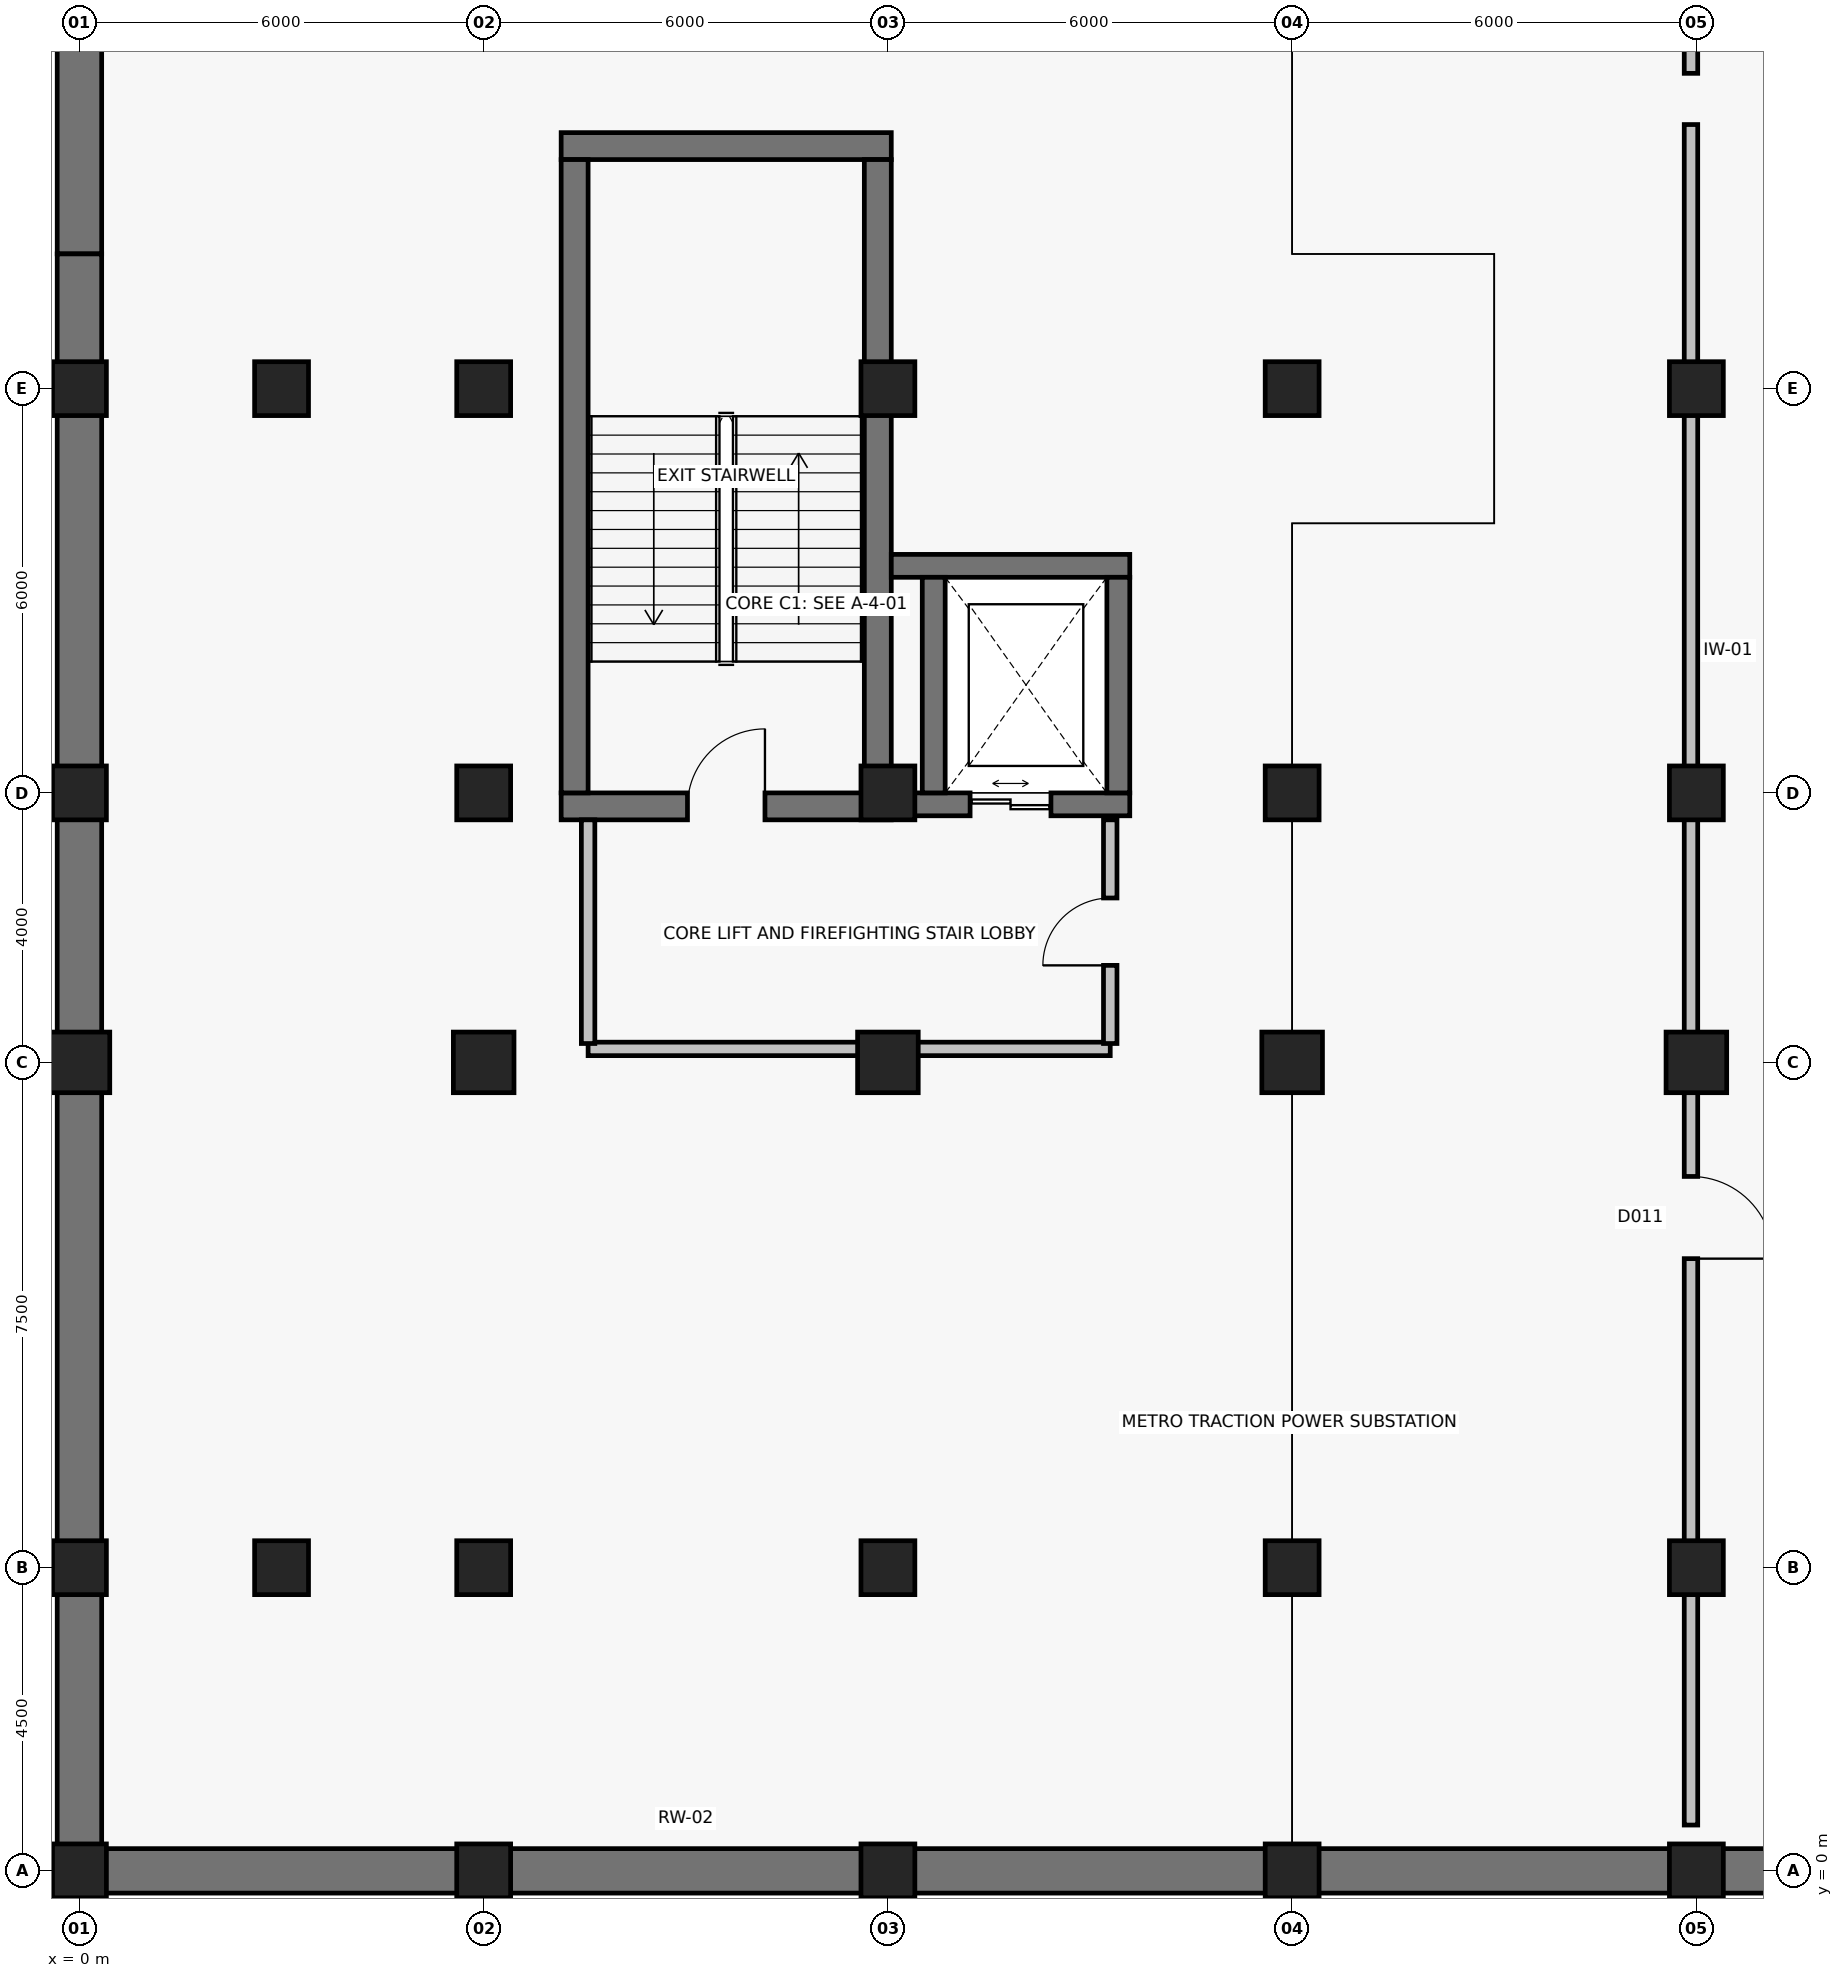
"""IFC4 building model, lengths in metres.
Left out: names, types, materials, properties, quantities, classifications, styles, units other than length and angle.
Written with IfcOpenShell. Run it as: python <this file> out.ifc"""

import sys

from ifc_helpers import new_model, si_unit, direction, frame, frame_2d, origin, origin_2d, place, context, subcontext, project, spatial, rectangle, extrude, element, fill, save


model = new_model("IFC4")
c1 = context("Model", 3, precision=1e-05, world=origin(), true_north=direction((0.0, 1.0)))
c2 = subcontext(c1, "Body", "Model", "MODEL_VIEW")
j1 = project(units=[si_unit("LENGTHUNIT", "METRE"), si_unit("PLANEANGLEUNIT", "RADIAN")], contexts=[c1])
p1 = place(None, origin())
s1 = spatial("IfcSite", under=j1, at=p1, CompositionType="ELEMENT")
p2 = place(p1, origin())
s2 = spatial("IfcBuilding", under=s1, at=p2, CompositionType="ELEMENT")
p3 = place(p2, frame((0.0, 0.0, -4.8)))
s3 = spatial("IfcBuildingStorey", under=s2, at=p3, CompositionType="ELEMENT", Elevation=-4.8)
for number, where, z_axis, x_axis in (
    (1, (0.0, 0.0, 0.0), (0.0, 0.0, 1.0), (1.0, 0.0, 0.0)),
    (2, (0.0, 4.5, 0.0), (0.0, 0.0, 1.0), (1.0, 0.0, 0.0)),
):
    element("IfcColumn", number, at=place(p3, frame(where, z_axis=z_axis, x_axis=x_axis)), inside=s3, PredefinedType="COLUMN", context=c2, shape_type="SweptSolid", body=[
        extrude(rectangle(XDim=0.8, YDim=0.8, at=origin_2d()), origin(), (0.0, 0.0, 1.0), 4.8),
    ])
p4 = place(p3, frame((0.0, 12.0, 0.0), z_axis=(0.0, 0.0, 1.0), x_axis=(1.0, 0.0, 0.0)))
e3 = element("IfcColumn", 3, at=p4, inside=s3, PredefinedType="COLUMN", context=c2, shape_type="SweptSolid", body=[
    extrude(rectangle(XDim=0.9, YDim=0.9, at=origin_2d()), origin(), (0.0, 0.0, 1.0), 4.8),
])
for number, where, z_axis, x_axis in (
    (4, (0.0, 16.0, 0.0), (0.0, 0.0, 1.0), (1.0, 0.0, 0.0)),
    (5, (0.0, 22.0, 0.0), (0.0, 0.0, 1.0), (1.0, 0.0, 0.0)),
    (6, (3.0, 4.5, 0.0), (0.0, 0.0, 1.0), (1.0, 0.0, 0.0)),
    (7, (3.0, 22.0, 0.0), (0.0, 0.0, 1.0), (1.0, 0.0, 0.0)),
    (8, (6.0, 0.0, 0.0), (0.0, 0.0, 1.0), (1.0, 0.0, 0.0)),
    (9, (6.0, 4.5, 0.0), (0.0, 0.0, 1.0), (1.0, 0.0, 0.0)),
):
    element("IfcColumn", number, at=place(p3, frame(where, z_axis=z_axis, x_axis=x_axis)), inside=s3, PredefinedType="COLUMN", context=c2, shape_type="SweptSolid", body=[
        extrude(rectangle(XDim=0.8, YDim=0.8, at=origin_2d()), origin(), (0.0, 0.0, 1.0), 4.8),
    ])
p5 = place(p3, frame((6.0, 12.0, 0.0), z_axis=(0.0, 0.0, 1.0), x_axis=(1.0, 0.0, 0.0)))
e10 = element("IfcColumn", 10, at=p5, inside=s3, PredefinedType="COLUMN", context=c2, shape_type="SweptSolid", body=[
    extrude(rectangle(XDim=0.9, YDim=0.9, at=origin_2d()), origin(), (0.0, 0.0, 1.0), 4.8),
])
for number, where, z_axis, x_axis in (
    (11, (6.0, 16.0, 0.0), (0.0, 0.0, 1.0), (1.0, 0.0, 0.0)),
    (12, (6.0, 22.0, 0.0), (0.0, 0.0, 1.0), (1.0, 0.0, 0.0)),
    (13, (12.0, 0.0, 0.0), (0.0, 0.0, 1.0), (1.0, 0.0, 0.0)),
    (14, (12.0, 4.5, 0.0), (0.0, 0.0, 1.0), (1.0, 0.0, 0.0)),
):
    element("IfcColumn", number, at=place(p3, frame(where, z_axis=z_axis, x_axis=x_axis)), inside=s3, PredefinedType="COLUMN", context=c2, shape_type="SweptSolid", body=[
        extrude(rectangle(XDim=0.8, YDim=0.8, at=origin_2d()), origin(), (0.0, 0.0, 1.0), 4.8),
    ])
p6 = place(p3, frame((12.0, 12.0, 0.0), z_axis=(0.0, 0.0, 1.0), x_axis=(1.0, 0.0, 0.0)))
e15 = element("IfcColumn", 15, at=p6, inside=s3, PredefinedType="COLUMN", context=c2, shape_type="SweptSolid", body=[
    extrude(rectangle(XDim=0.9, YDim=0.9, at=origin_2d()), origin(), (0.0, 0.0, 1.0), 4.8),
])
for number, where, z_axis, x_axis in (
    (16, (12.0, 16.0, 0.0), (0.0, 0.0, 1.0), (1.0, 0.0, 0.0)),
    (17, (12.0, 22.0, 0.0), (0.0, 0.0, 1.0), (1.0, 0.0, 0.0)),
    (18, (18.0, 0.0, 0.0), (0.0, 0.0, 1.0), (1.0, 0.0, 0.0)),
    (19, (18.0, 4.5, 0.0), (0.0, 0.0, 1.0), (1.0, 0.0, 0.0)),
):
    element("IfcColumn", number, at=place(p3, frame(where, z_axis=z_axis, x_axis=x_axis)), inside=s3, PredefinedType="COLUMN", context=c2, shape_type="SweptSolid", body=[
        extrude(rectangle(XDim=0.8, YDim=0.8, at=origin_2d()), origin(), (0.0, 0.0, 1.0), 4.8),
    ])
p7 = place(p3, frame((18.0, 12.0, 0.0), z_axis=(0.0, 0.0, 1.0), x_axis=(1.0, 0.0, 0.0)))
e20 = element("IfcColumn", 20, at=p7, inside=s3, PredefinedType="COLUMN", context=c2, shape_type="SweptSolid", body=[
    extrude(rectangle(XDim=0.9, YDim=0.9, at=origin_2d()), origin(), (0.0, 0.0, 1.0), 4.8),
])
for number, where, z_axis, x_axis in (
    (21, (18.0, 16.0, 0.0), (0.0, 0.0, 1.0), (1.0, 0.0, 0.0)),
    (22, (18.0, 22.0, 0.0), (0.0, 0.0, 1.0), (1.0, 0.0, 0.0)),
    (23, (24.0, 0.0, 0.0), (0.0, 0.0, 1.0), (1.0, 0.0, 0.0)),
    (24, (24.0, 4.5, 0.0), (0.0, 0.0, 1.0), (1.0, 0.0, 0.0)),
):
    element("IfcColumn", number, at=place(p3, frame(where, z_axis=z_axis, x_axis=x_axis)), inside=s3, PredefinedType="COLUMN", context=c2, shape_type="SweptSolid", body=[
        extrude(rectangle(XDim=0.8, YDim=0.8, at=origin_2d()), origin(), (0.0, 0.0, 1.0), 4.8),
    ])
p8 = place(p3, frame((24.0, 12.0, 0.0), z_axis=(0.0, 0.0, 1.0), x_axis=(1.0, 0.0, 0.0)))
e25 = element("IfcColumn", 25, at=p8, inside=s3, PredefinedType="COLUMN", context=c2, shape_type="SweptSolid", body=[
    extrude(rectangle(XDim=0.9, YDim=0.9, at=origin_2d()), origin(), (0.0, 0.0, 1.0), 4.8),
])
for number, where, z_axis, x_axis in (
    (26, (24.0, 16.0, 0.0), (0.0, 0.0, 1.0), (1.0, 0.0, 0.0)),
    (27, (24.0, 22.0, 0.0), (0.0, 0.0, 1.0), (1.0, 0.0, 0.0)),
):
    element("IfcColumn", number, at=place(p3, frame(where, z_axis=z_axis, x_axis=x_axis)), inside=s3, PredefinedType="COLUMN", context=c2, shape_type="SweptSolid", body=[
        extrude(rectangle(XDim=0.8, YDim=0.8, at=origin_2d()), origin(), (0.0, 0.0, 1.0), 4.8),
    ])
for number, where, z_axis, x_axis in (
    (28, (0.0, 0.0, 0.0), (0.0, 0.0, 1.0), (1.0, 0.0, 0.0)),
    (29, (18.0, 0.0, 0.0), (0.0, 0.0, 1.0), (1.0, 0.0, 0.0)),
):
    element("IfcWall", number, at=place(p3, frame(where, z_axis=z_axis, x_axis=x_axis)), inside=s3, PredefinedType="USERDEFINED", context=c2, shape_type="SweptSolid", body=[
        extrude(rectangle(XDim=18.0, YDim=0.66, at=frame_2d((9.0, 0.0))), origin(), (0.0, 0.0, 1.0), 4.4),
    ])
for number, where, z_axis, x_axis in (
    (30, (0.0, 48.0, 0.0), (0.0, 0.0, 1.0), (0.0, -1.0, 0.0)),
    (31, (0.0, 24.0, 0.0), (0.0, 0.0, 1.0), (0.0, -1.0, 0.0)),
):
    element("IfcWall", number, at=place(p3, frame(where, z_axis=z_axis, x_axis=x_axis)), inside=s3, PredefinedType="USERDEFINED", context=c2, shape_type="SweptSolid", body=[
        extrude(rectangle(XDim=24.0, YDim=0.66, at=frame_2d((12.0, 0.0))), origin(), (0.0, 0.0, 1.0), 4.4),
    ])
p9 = place(p3, frame((7.15, 15.8, 0.0), z_axis=(0.0, 0.0, 1.0), x_axis=(1.0, 0.0, 0.0)))
e32 = element("IfcWall", 32, at=p9, inside=s3, PredefinedType="SHEAR", context=c2, shape_type="SweptSolid", body=[
    extrude(rectangle(XDim=4.9, YDim=0.4, at=frame_2d((2.45, 0.0))), origin(), (0.0, 0.0, 1.0), 4.4),
])
p10 = place(p9, frame((1.875, 0.0, 0.0)))
e33 = element("IfcOpeningElement", 33, at=p10, cuts=e32, PredefinedType="OPENING", context=c2, shape_type="SweptSolid", body=[
    extrude(rectangle(XDim=1.15, YDim=2.15, at=frame_2d((0.575, 1.075))), frame((0.0, 0.215, 0.0), z_axis=(0.0, -1.0, 0.0), x_axis=(1.0, 0.0, 0.0)), (0.0, 0.0, 1.0), 0.43),
])
p11 = place(p3, frame((12.05, 25.6, 0.0), z_axis=(0.0, 0.0, 1.0), x_axis=(-1.0, 0.0, 0.0)))
e34 = element("IfcWall", 34, at=p11, inside=s3, PredefinedType="SHEAR", context=c2, shape_type="SweptSolid", body=[
    extrude(rectangle(XDim=4.9, YDim=0.4, at=frame_2d((2.45, 0.0))), origin(), (0.0, 0.0, 1.0), 4.4),
])
for number, where, z_axis, x_axis in (
    (35, (7.35, 25.4, 0.0), (0.0, 0.0, 1.0), (0.0, -1.0, 0.0)),
    (36, (11.85, 16.0, 0.0), (0.0, 0.0, 1.0), (0.0, 1.0, 0.0)),
):
    element("IfcWall", number, at=place(p3, frame(where, z_axis=z_axis, x_axis=x_axis)), inside=s3, PredefinedType="SHEAR", context=c2, shape_type="SweptSolid", body=[
        extrude(rectangle(XDim=9.4, YDim=0.4, at=frame_2d((4.7, 0.0))), origin(), (0.0, 0.0, 1.0), 4.4),
    ])
p12 = place(p3, frame((12.05, 15.83, 0.0), z_axis=(0.0, 0.0, 1.0), x_axis=(1.0, 0.0, 0.0)))
e37 = element("IfcWall", 37, at=p12, inside=s3, PredefinedType="SHEAR", context=c2, shape_type="SweptSolid", body=[
    extrude(rectangle(XDim=3.54, YDim=0.34, at=frame_2d((1.77, 0.0))), origin(), (0.0, 0.0, 1.0), 4.4),
])
p13 = place(p12, frame((1.17, 0.0, 0.0)))
e38 = element("IfcOpeningElement", 38, at=p13, cuts=e37, PredefinedType="OPENING", context=c2, shape_type="SweptSolid", body=[
    extrude(rectangle(XDim=1.2, YDim=2.2, at=frame_2d((0.6, 1.1))), frame((0.0, 0.185, 0.0), z_axis=(0.0, -1.0, 0.0), x_axis=(1.0, 0.0, 0.0)), (0.0, 0.0, 1.0), 0.37),
])
p14 = place(p3, frame((15.59, 19.37, 0.0), z_axis=(0.0, 0.0, 1.0), x_axis=(-1.0, 0.0, 0.0)))
e39 = element("IfcWall", 39, at=p14, inside=s3, PredefinedType="SHEAR", context=c2, shape_type="SweptSolid", body=[
    extrude(rectangle(XDim=3.54, YDim=0.34, at=frame_2d((1.77, 0.0))), origin(), (0.0, 0.0, 1.0), 4.4),
])
for number, where, z_axis, x_axis in (
    (40, (12.68, 19.2, 0.0), (0.0, 0.0, 1.0), (0.0, -1.0, 0.0)),
    (41, (15.42, 16.0, 0.0), (0.0, 0.0, 1.0), (0.0, 1.0, 0.0)),
):
    element("IfcWall", number, at=place(p3, frame(where, z_axis=z_axis, x_axis=x_axis)), inside=s3, PredefinedType="SHEAR", context=c2, shape_type="SweptSolid", body=[
        extrude(rectangle(XDim=3.2, YDim=0.34, at=frame_2d((1.6, 0.0))), origin(), (0.0, 0.0, 1.0), 4.4),
    ])
p15 = place(p3, frame((7.55, 12.2, 0.0), z_axis=(0.0, 0.0, 1.0), x_axis=(1.0, 0.0, 0.0)))
e42 = element("IfcWall", 42, at=p15, inside=s3, PredefinedType="PARTITIONING", context=c2, shape_type="SweptSolid", body=[
    extrude(rectangle(XDim=7.75, YDim=0.2, at=frame_2d((3.875, 0.0))), origin(), (0.0, 0.0, 1.0), 3.741),
])
p16 = place(p3, frame((7.55, 15.6, 0.0), z_axis=(0.0, 0.0, 1.0), x_axis=(0.0, -1.0, 0.0)))
e43 = element("IfcWall", 43, at=p16, inside=s3, PredefinedType="PARTITIONING", context=c2, shape_type="SweptSolid", body=[
    extrude(rectangle(XDim=3.32, YDim=0.2, at=frame_2d((1.66, 0.0))), origin(), (0.0, 0.0, 1.0), 3.741),
])
p17 = place(p3, frame((15.3, 12.28, 0.0), z_axis=(0.0, 0.0, 1.0), x_axis=(0.0, 1.0, 0.0)))
e44 = element("IfcWall", 44, at=p17, inside=s3, PredefinedType="PARTITIONING", context=c2, shape_type="SweptSolid", body=[
    extrude(rectangle(XDim=3.32, YDim=0.2, at=frame_2d((1.66, 0.0))), origin(), (0.0, 0.0, 1.0), 3.817),
])
p18 = place(p17, frame((1.16, 0.0, 0.0)))
e45 = element("IfcOpeningElement", 45, at=p18, cuts=e44, PredefinedType="OPENING", context=c2, shape_type="SweptSolid", body=[
    extrude(rectangle(XDim=1.0, YDim=2.15, at=frame_2d((0.5, 1.075))), frame((0.0, 0.115, 0.0), z_axis=(0.0, -1.0, 0.0), x_axis=(1.0, 0.0, 0.0)), (0.0, 0.0, 1.0), 0.23),
])
p19 = place(p3, frame((23.92, 25.92, 0.0), z_axis=(0.0, 0.0, 1.0), x_axis=(0.0, -1.0, 0.0)))
e46 = element("IfcWall", 46, at=p19, inside=s3, PredefinedType="PARTITIONING", context=c2, shape_type="SweptSolid", body=[
    extrude(rectangle(XDim=25.24, YDim=0.2, at=frame_2d((12.62, 0.0))), origin(), (0.0, 0.0, 1.0), 3.741),
])
p20 = place(p19, frame((15.613, 0.0, 0.0)))
e47 = element("IfcOpeningElement", 47, at=p20, cuts=e46, PredefinedType="OPENING", context=c2, shape_type="SweptSolid", body=[
    extrude(rectangle(XDim=1.22, YDim=2.2, at=frame_2d((0.61, 1.1))), frame((0.0, 0.115, 0.0), z_axis=(0.0, -1.0, 0.0), x_axis=(1.0, 0.0, 0.0)), (0.0, 0.0, 1.0), 0.23),
])
p21 = place(p3, frame((23.92, 51.92, 0.0), z_axis=(0.0, 0.0, 1.0), x_axis=(0.0, -1.0, 0.0)))
e48 = element("IfcWall", 48, at=p21, inside=s3, PredefinedType="PARTITIONING", context=c2, shape_type="SweptSolid", body=[
    extrude(rectangle(XDim=25.24, YDim=0.2, at=frame_2d((12.62, 0.0))), origin(), (0.0, 0.0, 1.0), 3.587),
])
p22 = place(p21, frame((5.262, 0.0, 0.0)))
e49 = element("IfcOpeningElement", 49, at=p22, cuts=e48, PredefinedType="OPENING", context=c2, shape_type="SweptSolid", body=[
    extrude(rectangle(XDim=1.32, YDim=2.2, at=frame_2d((0.66, 1.1))), frame((0.0, 0.115, 0.0), z_axis=(0.0, -1.0, 0.0), x_axis=(1.0, 0.0, 0.0)), (0.0, 0.0, 1.0), 0.23),
])
p23 = place(p10, origin())
e50 = element("IfcDoor", 50, at=p23, inside=s3, OperationType="SINGLE_SWING_RIGHT", PredefinedType="DOOR", context=c2, shape_type="SweptSolid", body=[
    extrude(rectangle(XDim=1.15, YDim=2.15, at=frame_2d((0.575, 1.075))), frame((0.0, 0.025, 0.0), z_axis=(0.0, -1.0, 0.0), x_axis=(1.0, 0.0, 0.0)), (0.0, 0.0, 1.0), 0.05),
])
fill(e33, e50)
p24 = place(p13, origin())
e51 = element("IfcDoor", 51, at=p24, inside=s3, OperationType="DOUBLE_DOOR_SLIDING", PredefinedType="DOOR", context=c2, shape_type="SweptSolid", body=[
    extrude(rectangle(XDim=1.2, YDim=2.2, at=frame_2d((0.6, 1.1))), frame((0.0, 0.025, 0.0), z_axis=(0.0, -1.0, 0.0), x_axis=(1.0, 0.0, 0.0)), (0.0, 0.0, 1.0), 0.05),
])
fill(e38, e51)
p25 = place(p18, origin())
e52 = element("IfcDoor", 52, at=p25, inside=s3, OperationType="SINGLE_SWING_LEFT", PredefinedType="DOOR", context=c2, shape_type="SweptSolid", body=[
    extrude(rectangle(XDim=1.0, YDim=2.15, at=frame_2d((0.5, 1.075))), frame((0.0, 0.025, 0.0), z_axis=(0.0, -1.0, 0.0), x_axis=(1.0, 0.0, 0.0)), (0.0, 0.0, 1.0), 0.05),
])
fill(e45, e52)
p26 = place(p20, origin())
e53 = element("IfcDoor", 53, at=p26, inside=s3, OperationType="SINGLE_SWING_RIGHT", PredefinedType="DOOR", context=c2, shape_type="SweptSolid", body=[
    extrude(rectangle(XDim=1.22, YDim=2.2, at=frame_2d((0.61, 1.1))), frame((0.0, 0.025, 0.0), z_axis=(0.0, -1.0, 0.0), x_axis=(1.0, 0.0, 0.0)), (0.0, 0.0, 1.0), 0.05),
])
fill(e47, e53)
save(model, sys.argv[1])
